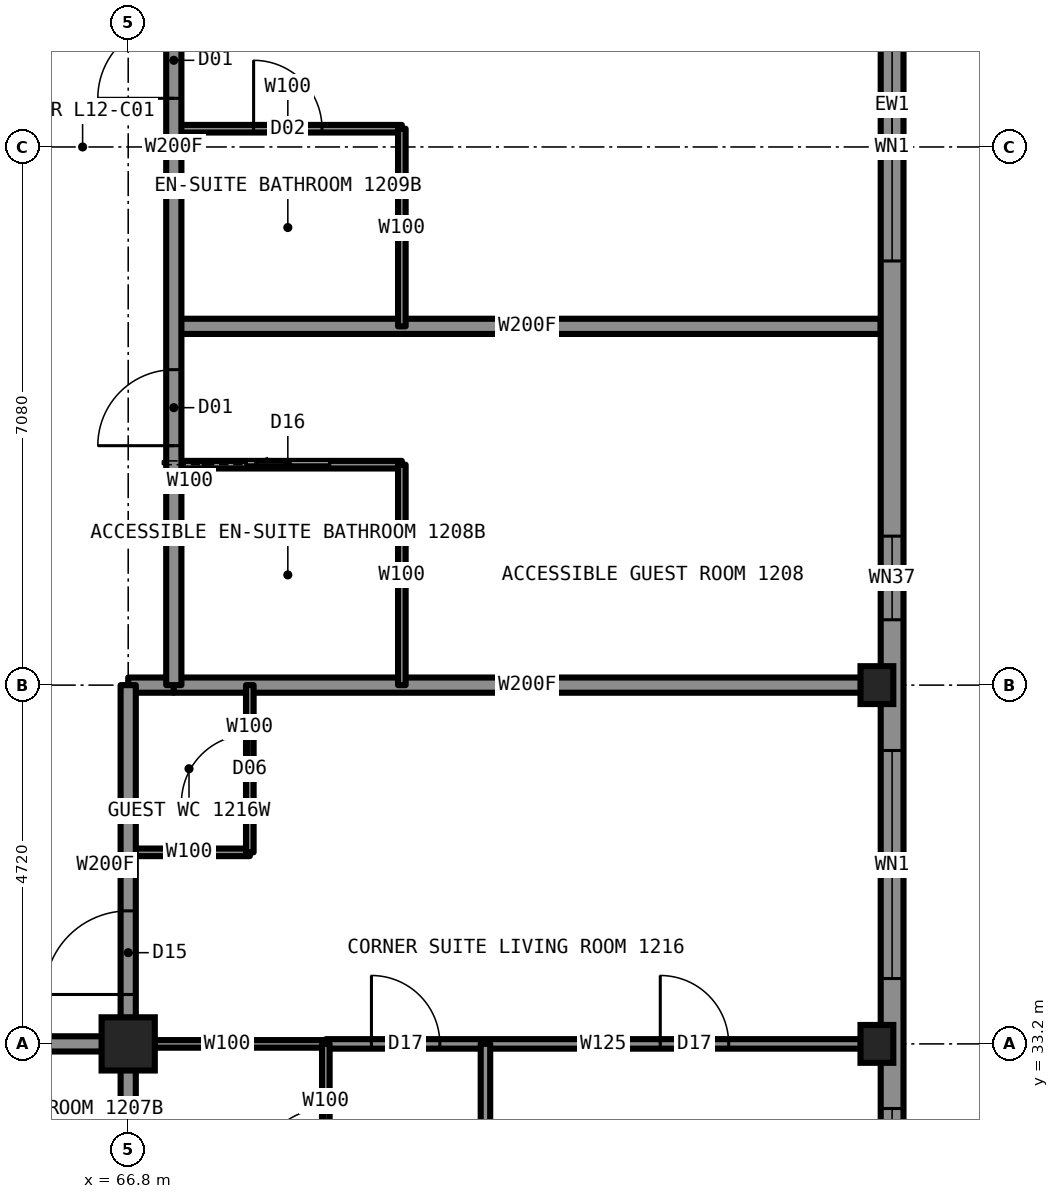
"""IFC4 building model, lengths in metres.
Left out: names, types, materials, properties, quantities, classifications, styles, units other than length and angle.
Written with IfcOpenShell. Run it as: python <this file> out.ifc"""

import sys

from ifc_helpers import new_model, si_unit, direction, frame, frame_2d, origin, origin_2d, place, context, subcontext, project, spatial, rectangle, hollow_rectangle, i_section, extrude, element, fill, save


model = new_model("IFC4")
c1 = context("Model", 3, precision=1e-05, world=origin(), true_north=direction((0.0, 1.0)))
c2 = subcontext(c1, "Body", "Model", "MODEL_VIEW")
j1 = project(units=[si_unit("LENGTHUNIT", "METRE"), si_unit("PLANEANGLEUNIT", "RADIAN")], contexts=[c1])
p1 = place(None, origin())
s1 = spatial("IfcSite", under=j1, at=p1, CompositionType="ELEMENT")
p2 = place(p1, origin())
s2 = spatial("IfcBuilding", under=s1, at=p2, CompositionType="ELEMENT")
p3 = place(p2, frame((0.0, 0.0, 49.5)))
s3 = spatial("IfcBuildingStorey", under=s2, at=p3, CompositionType="ELEMENT", Elevation=49.5)
for number, where, z_axis, x_axis in (
    (1, (76.65, 33.2, 0.0), (0.0, 0.0, 1.0), (1.0, 0.0, 0.0)),
    (2, (76.65, 37.92, 0.0), (0.0, 0.0, 1.0), (1.0, 0.0, 0.0)),
):
    element("IfcColumn", number, at=place(p3, frame(where, z_axis=z_axis, x_axis=x_axis)), inside=s3, PredefinedType="COLUMN", context=c2, shape_type="SweptSolid", body=[
        extrude(i_section(OverallWidth=0.432, OverallDepth=0.498, WebThickness=0.056, FlangeThickness=0.089, at=origin_2d()), origin(), (0.0, 0.0, 1.0), 3.5),
    ])
p4 = place(p3, frame((66.8, 33.2, 0.0), z_axis=(0.0, 0.0, 1.0), x_axis=(1.0, 0.0, 0.0)))
e3 = element("IfcColumn", 3, at=p4, inside=s3, PredefinedType="COLUMN", context=c2, shape_type="SweptSolid", body=[
    extrude(hollow_rectangle(XDim=0.7, YDim=0.7, WallThickness=0.06, at=origin_2d()), origin(), (0.0, 0.0, 1.0), 3.5),
])
p5 = place(p3, frame((66.8, 33.2, 0.0), z_axis=(0.0, 0.0, 1.0), x_axis=(1.0, 0.0, 0.0)))
e4 = element("IfcWall", 4, at=p5, inside=s3, PredefinedType="PARTITIONING", context=c2, shape_type="SweptSolid", body=[
    extrude(rectangle(XDim=2.6, YDim=0.1, at=frame_2d((1.3, 0.0))), origin(), (0.0, 0.0, 1.0), 2.573),
])
p6 = place(p3, frame((43.2, 33.2, 0.0), z_axis=(0.0, 0.0, 1.0), x_axis=(1.0, 0.0, 0.0)))
e5 = element("IfcWall", 5, at=p6, inside=s3, PredefinedType="PARTITIONING", context=c2, shape_type="SweptSolid", body=[
    extrude(rectangle(XDim=23.6, YDim=0.2, at=frame_2d((11.8, 0.0))), origin(), (0.0, 0.0, 1.0), 3.33),
])
p7 = place(p6, frame((3.0, 0.0, 0.0)))
e6 = element("IfcOpeningElement", 6, at=p7, cuts=e5, PredefinedType="OPENING", context=c2, shape_type="SweptSolid", body=[
    extrude(rectangle(XDim=1.0, YDim=2.2, at=frame_2d((0.5, 1.1))), frame((0.0, 0.11, 0.0), z_axis=(0.0, -1.0, 0.0), x_axis=(1.0, 0.0, 0.0)), (0.0, 0.0, 1.0), 0.22),
])
p8 = place(p6, frame((12.44, 0.0, 0.0)))
e7 = element("IfcOpeningElement", 7, at=p8, cuts=e5, PredefinedType="OPENING", context=c2, shape_type="SweptSolid", body=[
    extrude(rectangle(XDim=1.0, YDim=2.2, at=frame_2d((0.5, 1.1))), frame((0.0, 0.11, 0.0), z_axis=(0.0, -1.0, 0.0), x_axis=(1.0, 0.0, 0.0)), (0.0, 0.0, 1.0), 0.22),
])
p9 = place(p6, frame((19.28, 0.0, 0.0)))
e8 = element("IfcOpeningElement", 8, at=p9, cuts=e5, PredefinedType="OPENING", context=c2, shape_type="SweptSolid", body=[
    extrude(rectangle(XDim=1.0, YDim=2.2, at=frame_2d((0.5, 1.1))), frame((0.0, 0.11, 0.0), z_axis=(0.0, -1.0, 0.0), x_axis=(1.0, 0.0, 0.0)), (0.0, 0.0, 1.0), 0.22),
])
p10 = place(p3, frame((69.4, 33.2, 0.0), z_axis=(0.0, 0.0, 1.0), x_axis=(1.0, 0.0, 0.0)))
e9 = element("IfcWall", 9, at=p10, inside=s3, PredefinedType="PARTITIONING", context=c2, shape_type="SweptSolid", body=[
    extrude(rectangle(XDim=7.3, YDim=0.125, at=frame_2d((3.65, 0.0))), origin(), (0.0, 0.0, 1.0), 2.573),
])
p11 = place(p10, frame((0.6, 0.0, 0.0)))
e10 = element("IfcOpeningElement", 10, at=p11, cuts=e9, PredefinedType="OPENING", context=c2, shape_type="SweptSolid", body=[
    extrude(rectangle(XDim=0.9, YDim=2.2, at=frame_2d((0.45, 1.1))), frame((0.0, 0.073, 0.0), z_axis=(0.0, -1.0, 0.0), x_axis=(1.0, 0.0, 0.0)), (0.0, 0.0, 1.0), 0.145),
])
p12 = place(p10, frame((4.4, 0.0, 0.0)))
e11 = element("IfcOpeningElement", 11, at=p12, cuts=e9, PredefinedType="OPENING", context=c2, shape_type="SweptSolid", body=[
    extrude(rectangle(XDim=0.9, YDim=2.2, at=frame_2d((0.45, 1.1))), frame((0.0, 0.073, 0.0), z_axis=(0.0, -1.0, 0.0), x_axis=(1.0, 0.0, 0.0)), (0.0, 0.0, 1.0), 0.145),
])
p13 = place(p3, frame((67.4, 42.64, 0.0), z_axis=(0.0, 0.0, 1.0), x_axis=(1.0, 0.0, 0.0)))
e12 = element("IfcWall", 12, at=p13, inside=s3, PredefinedType="PARTITIONING", context=c2, shape_type="SweptSolid", body=[
    extrude(rectangle(XDim=9.3, YDim=0.2, at=frame_2d((4.65, 0.0))), origin(), (0.0, 0.0, 1.0), 2.723),
])
p14 = place(p3, frame((67.4, 40.82, 0.0), z_axis=(0.0, 0.0, 1.0), x_axis=(1.0, 0.0, 0.0)))
e13 = element("IfcWall", 13, at=p14, inside=s3, PredefinedType="PARTITIONING", context=c2, shape_type="SweptSolid", body=[
    extrude(rectangle(XDim=3.0, YDim=0.1, at=frame_2d((1.5, 0.0))), origin(), (0.0, 0.0, 1.0), 3.33),
])
p15 = place(p14, frame((0.95, 0.0, 0.0)))
e14 = element("IfcOpeningElement", 14, at=p15, cuts=e13, PredefinedType="OPENING", context=c2, shape_type="SweptSolid", body=[
    extrude(rectangle(XDim=1.1, YDim=2.1, at=frame_2d((0.55, 1.05))), frame((0.0, 0.06, 0.0), z_axis=(0.0, -1.0, 0.0), x_axis=(1.0, 0.0, 0.0)), (0.0, 0.0, 1.0), 0.12),
])
p16 = place(p3, frame((66.8, 37.92, 0.0), z_axis=(0.0, 0.0, 1.0), x_axis=(1.0, 0.0, 0.0)))
e15 = element("IfcWall", 15, at=p16, inside=s3, PredefinedType="PARTITIONING", context=c2, shape_type="SweptSolid", body=[
    extrude(rectangle(XDim=0.6, YDim=0.2, at=frame_2d((0.3, 0.0))), origin(), (0.0, 0.0, 1.0), 2.573),
])
p17 = place(p3, frame((67.4, 37.92, 0.0), z_axis=(0.0, 0.0, 1.0), x_axis=(1.0, 0.0, 0.0)))
e16 = element("IfcWall", 16, at=p17, inside=s3, PredefinedType="PARTITIONING", context=c2, shape_type="SweptSolid", body=[
    extrude(rectangle(XDim=9.3, YDim=0.2, at=frame_2d((4.65, 0.0))), origin(), (0.0, 0.0, 1.0), 2.573),
])
p18 = place(p3, frame((66.8, 35.72, 0.0), z_axis=(0.0, 0.0, 1.0), x_axis=(1.0, 0.0, 0.0)))
e17 = element("IfcWall", 17, at=p18, inside=s3, PredefinedType="PARTITIONING", context=c2, shape_type="SweptSolid", body=[
    extrude(rectangle(XDim=1.6, YDim=0.1, at=frame_2d((0.8, 0.0))), origin(), (0.0, 0.0, 1.0), 2.723),
])
p19 = place(p3, frame((67.4, 45.24, 0.0), z_axis=(0.0, 0.0, 1.0), x_axis=(1.0, 0.0, 0.0)))
e18 = element("IfcWall", 18, at=p19, inside=s3, PredefinedType="PARTITIONING", context=c2, shape_type="SweptSolid", body=[
    extrude(rectangle(XDim=3.0, YDim=0.1, at=frame_2d((1.5, 0.0))), origin(), (0.0, 0.0, 1.0), 3.33),
])
p20 = place(p19, frame((1.05, 0.0, 0.0)))
e19 = element("IfcOpeningElement", 19, at=p20, cuts=e18, PredefinedType="OPENING", context=c2, shape_type="SweptSolid", body=[
    extrude(rectangle(XDim=0.9, YDim=2.1, at=frame_2d((0.45, 1.05))), frame((0.0, 0.06, 0.0), z_axis=(0.0, -1.0, 0.0), x_axis=(1.0, 0.0, 0.0)), (0.0, 0.0, 1.0), 0.12),
])
p21 = place(p3, frame((66.8, 33.2, 0.0), z_axis=(0.0, 0.0, 1.0), x_axis=(0.0, 1.0, 0.0)))
e20 = element("IfcWall", 20, at=p21, inside=s3, PredefinedType="PARTITIONING", context=c2, shape_type="SweptSolid", body=[
    extrude(rectangle(XDim=4.72, YDim=0.2, at=frame_2d((2.36, 0.0))), origin(), (0.0, 0.0, 1.0), 3.33),
])
p22 = place(p21, frame((0.65, 0.0, 0.0)))
e21 = element("IfcOpeningElement", 21, at=p22, cuts=e20, PredefinedType="OPENING", context=c2, shape_type="SweptSolid", body=[
    extrude(rectangle(XDim=1.1, YDim=2.2, at=frame_2d((0.55, 1.1))), frame((0.0, 0.11, 0.0), z_axis=(0.0, -1.0, 0.0), x_axis=(1.0, 0.0, 0.0)), (0.0, 0.0, 1.0), 0.22),
])
p23 = place(p3, frame((66.8, 30.6, 0.0), z_axis=(0.0, 0.0, 1.0), x_axis=(0.0, 1.0, 0.0)))
e22 = element("IfcWall", 22, at=p23, inside=s3, PredefinedType="PARTITIONING", context=c2, shape_type="SweptSolid", body=[
    extrude(rectangle(XDim=2.6, YDim=0.2, at=frame_2d((1.3, 0.0))), origin(), (0.0, 0.0, 1.0), 2.573),
])
p24 = place(p3, frame((67.4, 37.92, 0.0), z_axis=(0.0, 0.0, 1.0), x_axis=(0.0, 1.0, 0.0)))
e23 = element("IfcWall", 23, at=p24, inside=s3, PredefinedType="PARTITIONING", context=c2, shape_type="SweptSolid", body=[
    extrude(rectangle(XDim=14.16, YDim=0.2, at=frame_2d((7.08, 0.0))), origin(), (0.0, 0.0, 1.0), 3.33),
])
p25 = place(p24, frame((3.15, 0.0, 0.0)))
e24 = element("IfcOpeningElement", 24, at=p25, cuts=e23, PredefinedType="OPENING", context=c2, shape_type="SweptSolid", body=[
    extrude(rectangle(XDim=1.0, YDim=2.2, at=frame_2d((0.5, 1.1))), frame((0.0, 0.11, 0.0), z_axis=(0.0, -1.0, 0.0), x_axis=(1.0, 0.0, 0.0)), (0.0, 0.0, 1.0), 0.22),
])
p26 = place(p24, frame((7.72, 0.0, 0.0)))
e25 = element("IfcOpeningElement", 25, at=p26, cuts=e23, PredefinedType="OPENING", context=c2, shape_type="SweptSolid", body=[
    extrude(rectangle(XDim=1.0, YDim=2.2, at=frame_2d((0.5, 1.1))), frame((0.0, 0.11, 0.0), z_axis=(0.0, -1.0, 0.0), x_axis=(1.0, 0.0, 0.0)), (0.0, 0.0, 1.0), 0.22),
])
p27 = place(p3, frame((68.4, 35.72, 0.0), z_axis=(0.0, 0.0, 1.0), x_axis=(0.0, 1.0, 0.0)))
e26 = element("IfcWall", 26, at=p27, inside=s3, PredefinedType="PARTITIONING", context=c2, shape_type="SweptSolid", body=[
    extrude(rectangle(XDim=2.2, YDim=0.1, at=frame_2d((1.1, 0.0))), origin(), (0.0, 0.0, 1.0), 3.33),
])
p28 = place(p27, frame((0.65, 0.0, 0.0)))
e27 = element("IfcOpeningElement", 27, at=p28, cuts=e26, PredefinedType="OPENING", context=c2, shape_type="SweptSolid", body=[
    extrude(rectangle(XDim=0.9, YDim=2.1, at=frame_2d((0.45, 1.05))), frame((0.0, 0.06, 0.0), z_axis=(0.0, -1.0, 0.0), x_axis=(1.0, 0.0, 0.0)), (0.0, 0.0, 1.0), 0.12),
])
p29 = place(p3, frame((69.4, 30.6, 0.0), z_axis=(0.0, 0.0, 1.0), x_axis=(0.0, 1.0, 0.0)))
e28 = element("IfcWall", 28, at=p29, inside=s3, PredefinedType="PARTITIONING", context=c2, shape_type="SweptSolid", body=[
    extrude(rectangle(XDim=2.6, YDim=0.1, at=frame_2d((1.3, 0.0))), origin(), (0.0, 0.0, 1.0), 3.33),
])
p30 = place(p29, frame((0.85, 0.0, 0.0)))
e29 = element("IfcOpeningElement", 29, at=p30, cuts=e28, PredefinedType="OPENING", context=c2, shape_type="SweptSolid", body=[
    extrude(rectangle(XDim=0.9, YDim=2.1, at=frame_2d((0.45, 1.05))), frame((0.0, 0.06, 0.0), z_axis=(0.0, -1.0, 0.0), x_axis=(1.0, 0.0, 0.0)), (0.0, 0.0, 1.0), 0.12),
])
p31 = place(p3, frame((70.4, 37.92, 0.0), z_axis=(0.0, 0.0, 1.0), x_axis=(0.0, 1.0, 0.0)))
e30 = element("IfcWall", 30, at=p31, inside=s3, PredefinedType="PARTITIONING", context=c2, shape_type="SweptSolid", body=[
    extrude(rectangle(XDim=2.9, YDim=0.1, at=frame_2d((1.45, 0.0))), origin(), (0.0, 0.0, 1.0), 3.33),
])
p32 = place(p3, frame((70.4, 42.64, 0.0), z_axis=(0.0, 0.0, 1.0), x_axis=(0.0, 1.0, 0.0)))
e31 = element("IfcWall", 31, at=p32, inside=s3, PredefinedType="PARTITIONING", context=c2, shape_type="SweptSolid", body=[
    extrude(rectangle(XDim=2.6, YDim=0.1, at=frame_2d((1.3, 0.0))), origin(), (0.0, 0.0, 1.0), 3.33),
])
p33 = place(p3, frame((71.5, 23.306, 0.0), z_axis=(0.0, 0.0, 1.0), x_axis=(0.0, 1.0, 0.0)))
e32 = element("IfcWall", 32, at=p33, inside=s3, PredefinedType="PARTITIONING", context=c2, shape_type="SweptSolid", body=[
    extrude(rectangle(XDim=9.894, YDim=0.125, at=frame_2d((4.947, 0.0))), origin(), (0.0, 0.0, 1.0), 3.33),
])
p34 = place(p3, frame((76.85, 28.5, 0.0), z_axis=(0.0, 0.0, 1.0), x_axis=(0.0, 1.0, 0.0)))
e33 = element("IfcWall", 33, at=p34, inside=s3, PredefinedType="SOLIDWALL", context=c2, shape_type="SweptSolid", body=[
    extrude(rectangle(XDim=33.0, YDim=0.3, at=frame_2d((16.5, 0.0))), origin(), (0.0, 0.0, 1.0), 2.83),
])
p35 = place(p34, frame((0.85, 0.0, 0.5)))
e34 = element("IfcOpeningElement", 34, at=p35, cuts=e33, PredefinedType="OPENING", context=c2, shape_type="SweptSolid", body=[
    extrude(rectangle(XDim=3.0, YDim=2.0, at=frame_2d((1.5, 1.0))), frame((0.0, 0.16, 0.0), z_axis=(0.0, -1.0, 0.0), x_axis=(1.0, 0.0, 0.0)), (0.0, 0.0, 1.0), 0.32),
])
p36 = place(p34, frame((5.56, 0.0, 0.5)))
e35 = element("IfcOpeningElement", 35, at=p36, cuts=e33, PredefinedType="OPENING", context=c2, shape_type="SweptSolid", body=[
    extrude(rectangle(XDim=3.0, YDim=2.0, at=frame_2d((1.5, 1.0))), frame((0.0, 0.16, 0.0), z_axis=(0.0, -1.0, 0.0), x_axis=(1.0, 0.0, 0.0)), (0.0, 0.0, 1.0), 0.32),
])
p37 = place(p34, frame((10.28, 0.0, 1.1)))
e36 = element("IfcOpeningElement", 36, at=p37, cuts=e33, PredefinedType="OPENING", context=c2, shape_type="SweptSolid", body=[
    extrude(rectangle(XDim=1.1, YDim=1.4, at=frame_2d((0.55, 0.7))), frame((0.0, 0.16, 0.0), z_axis=(0.0, -1.0, 0.0), x_axis=(1.0, 0.0, 0.0)), (0.0, 0.0, 1.0), 0.32),
])
p38 = place(p34, frame((15.0, 0.0, 0.5)))
e37 = element("IfcOpeningElement", 37, at=p38, cuts=e33, PredefinedType="OPENING", context=c2, shape_type="SweptSolid", body=[
    extrude(rectangle(XDim=3.0, YDim=2.0, at=frame_2d((1.5, 1.0))), frame((0.0, 0.16, 0.0), z_axis=(0.0, -1.0, 0.0), x_axis=(1.0, 0.0, 0.0)), (0.0, 0.0, 1.0), 0.32),
])
p39 = place(p34, frame((21.62, 0.0, 1.1)))
e38 = element("IfcOpeningElement", 38, at=p39, cuts=e33, PredefinedType="OPENING", context=c2, shape_type="SweptSolid", body=[
    extrude(rectangle(XDim=1.1, YDim=1.4, at=frame_2d((0.55, 0.7))), frame((0.0, 0.16, 0.0), z_axis=(0.0, -1.0, 0.0), x_axis=(1.0, 0.0, 0.0)), (0.0, 0.0, 1.0), 0.32),
])
p40 = place(p34, frame((24.44, 0.0, 0.5)))
e39 = element("IfcOpeningElement", 39, at=p40, cuts=e33, PredefinedType="OPENING", context=c2, shape_type="SweptSolid", body=[
    extrude(rectangle(XDim=3.0, YDim=2.0, at=frame_2d((1.5, 1.0))), frame((0.0, 0.16, 0.0), z_axis=(0.0, -1.0, 0.0), x_axis=(1.0, 0.0, 0.0)), (0.0, 0.0, 1.0), 0.32),
])
p41 = place(p34, frame((29.15, 0.0, 0.5)))
e40 = element("IfcOpeningElement", 40, at=p41, cuts=e33, PredefinedType="OPENING", context=c2, shape_type="SweptSolid", body=[
    extrude(rectangle(XDim=3.0, YDim=2.0, at=frame_2d((1.5, 1.0))), frame((0.0, 0.16, 0.0), z_axis=(0.0, -1.0, 0.0), x_axis=(1.0, 0.0, 0.0)), (0.0, 0.0, 1.0), 0.32),
])
p42 = place(p25, origin())
e41 = element("IfcDoor", 41, at=p42, inside=s3, OperationType="SINGLE_SWING_LEFT", PredefinedType="DOOR", context=c2, shape_type="SweptSolid", body=[
    extrude(rectangle(XDim=1.0, YDim=2.2, at=frame_2d((0.5, 1.1))), frame((0.0, 0.025, 0.0), z_axis=(0.0, -1.0, 0.0), x_axis=(1.0, 0.0, 0.0)), (0.0, 0.0, 1.0), 0.05),
])
fill(e24, e41)
p43 = place(p15, origin())
e42 = element("IfcDoor", 42, at=p43, inside=s3, OperationType="SLIDING_TO_LEFT", PredefinedType="DOOR", context=c2, shape_type="SweptSolid", body=[
    extrude(rectangle(XDim=1.1, YDim=2.1, at=frame_2d((0.55, 1.05))), frame((0.0, 0.025, 0.0), z_axis=(0.0, -1.0, 0.0), x_axis=(1.0, 0.0, 0.0)), (0.0, 0.0, 1.0), 0.05),
])
fill(e14, e42)
p44 = place(p26, origin())
e43 = element("IfcDoor", 43, at=p44, inside=s3, OperationType="SINGLE_SWING_LEFT", PredefinedType="DOOR", context=c2, shape_type="SweptSolid", body=[
    extrude(rectangle(XDim=1.0, YDim=2.2, at=frame_2d((0.5, 1.1))), frame((0.0, 0.025, 0.0), z_axis=(0.0, -1.0, 0.0), x_axis=(1.0, 0.0, 0.0)), (0.0, 0.0, 1.0), 0.05),
])
fill(e25, e43)
p45 = place(p20, origin())
e44 = element("IfcDoor", 44, at=p45, inside=s3, OperationType="SINGLE_SWING_RIGHT", PredefinedType="DOOR", context=c2, shape_type="SweptSolid", body=[
    extrude(rectangle(XDim=0.9, YDim=2.1, at=frame_2d((0.45, 1.05))), frame((0.0, 0.025, 0.0), z_axis=(0.0, -1.0, 0.0), x_axis=(1.0, 0.0, 0.0)), (0.0, 0.0, 1.0), 0.05),
])
fill(e19, e44)
p46 = place(p22, origin())
e45 = element("IfcDoor", 45, at=p46, inside=s3, OperationType="SINGLE_SWING_LEFT", PredefinedType="DOOR", context=c2, shape_type="SweptSolid", body=[
    extrude(rectangle(XDim=1.1, YDim=2.2, at=frame_2d((0.55, 1.1))), frame((0.0, 0.025, 0.0), z_axis=(0.0, -1.0, 0.0), x_axis=(1.0, 0.0, 0.0)), (0.0, 0.0, 1.0), 0.05),
])
fill(e21, e45)
p47 = place(p30, origin())
e46 = element("IfcDoor", 46, at=p47, inside=s3, OperationType="SINGLE_SWING_RIGHT", PredefinedType="DOOR", context=c2, shape_type="SweptSolid", body=[
    extrude(rectangle(XDim=0.9, YDim=2.1, at=frame_2d((0.45, 1.05))), frame((0.0, 0.025, 0.0), z_axis=(0.0, -1.0, 0.0), x_axis=(1.0, 0.0, 0.0)), (0.0, 0.0, 1.0), 0.05),
])
fill(e29, e46)
p48 = place(p11, origin())
e47 = element("IfcDoor", 47, at=p48, inside=s3, OperationType="SINGLE_SWING_LEFT", PredefinedType="DOOR", context=c2, shape_type="SweptSolid", body=[
    extrude(rectangle(XDim=0.9, YDim=2.2, at=frame_2d((0.45, 1.1))), frame((0.0, 0.025, 0.0), z_axis=(0.0, -1.0, 0.0), x_axis=(1.0, 0.0, 0.0)), (0.0, 0.0, 1.0), 0.05),
])
fill(e10, e47)
p49 = place(p12, origin())
e48 = element("IfcDoor", 48, at=p49, inside=s3, OperationType="SINGLE_SWING_LEFT", PredefinedType="DOOR", context=c2, shape_type="SweptSolid", body=[
    extrude(rectangle(XDim=0.9, YDim=2.2, at=frame_2d((0.45, 1.1))), frame((0.0, 0.025, 0.0), z_axis=(0.0, -1.0, 0.0), x_axis=(1.0, 0.0, 0.0)), (0.0, 0.0, 1.0), 0.05),
])
fill(e11, e48)
p50 = place(p28, origin())
e49 = element("IfcDoor", 49, at=p50, inside=s3, OperationType="SINGLE_SWING_LEFT", PredefinedType="DOOR", context=c2, shape_type="SweptSolid", body=[
    extrude(rectangle(XDim=0.9, YDim=2.1, at=frame_2d((0.45, 1.05))), frame((0.0, 0.025, 0.0), z_axis=(0.0, -1.0, 0.0), x_axis=(1.0, 0.0, 0.0)), (0.0, 0.0, 1.0), 0.05),
])
fill(e27, e49)
p51 = place(p35, origin())
e50 = element("IfcWindow", 50, at=p51, inside=s3, PartitioningType="SINGLE_PANEL", PredefinedType="WINDOW", context=c2, shape_type="SweptSolid", body=[
    extrude(rectangle(XDim=3.0, YDim=2.0, at=frame_2d((1.5, 1.0))), frame((0.0, 0.03, 0.0), z_axis=(0.0, -1.0, 0.0), x_axis=(1.0, 0.0, 0.0)), (0.0, 0.0, 1.0), 0.06),
])
fill(e34, e50)
p52 = place(p36, origin())
e51 = element("IfcWindow", 51, at=p52, inside=s3, PartitioningType="SINGLE_PANEL", PredefinedType="WINDOW", context=c2, shape_type="SweptSolid", body=[
    extrude(rectangle(XDim=3.0, YDim=2.0, at=frame_2d((1.5, 1.0))), frame((0.0, 0.03, 0.0), z_axis=(0.0, -1.0, 0.0), x_axis=(1.0, 0.0, 0.0)), (0.0, 0.0, 1.0), 0.06),
])
fill(e35, e51)
p53 = place(p37, origin())
e52 = element("IfcWindow", 52, at=p53, inside=s3, PartitioningType="SINGLE_PANEL", PredefinedType="WINDOW", context=c2, shape_type="SweptSolid", body=[
    extrude(rectangle(XDim=1.1, YDim=1.4, at=frame_2d((0.55, 0.7))), frame((0.0, 0.03, 0.0), z_axis=(0.0, -1.0, 0.0), x_axis=(1.0, 0.0, 0.0)), (0.0, 0.0, 1.0), 0.06),
])
fill(e36, e52)
p54 = place(p38, origin())
e53 = element("IfcWindow", 53, at=p54, inside=s3, PartitioningType="SINGLE_PANEL", PredefinedType="WINDOW", context=c2, shape_type="SweptSolid", body=[
    extrude(rectangle(XDim=3.0, YDim=2.0, at=frame_2d((1.5, 1.0))), frame((0.0, 0.03, 0.0), z_axis=(0.0, -1.0, 0.0), x_axis=(1.0, 0.0, 0.0)), (0.0, 0.0, 1.0), 0.06),
])
fill(e37, e53)
save(model, sys.argv[1])
